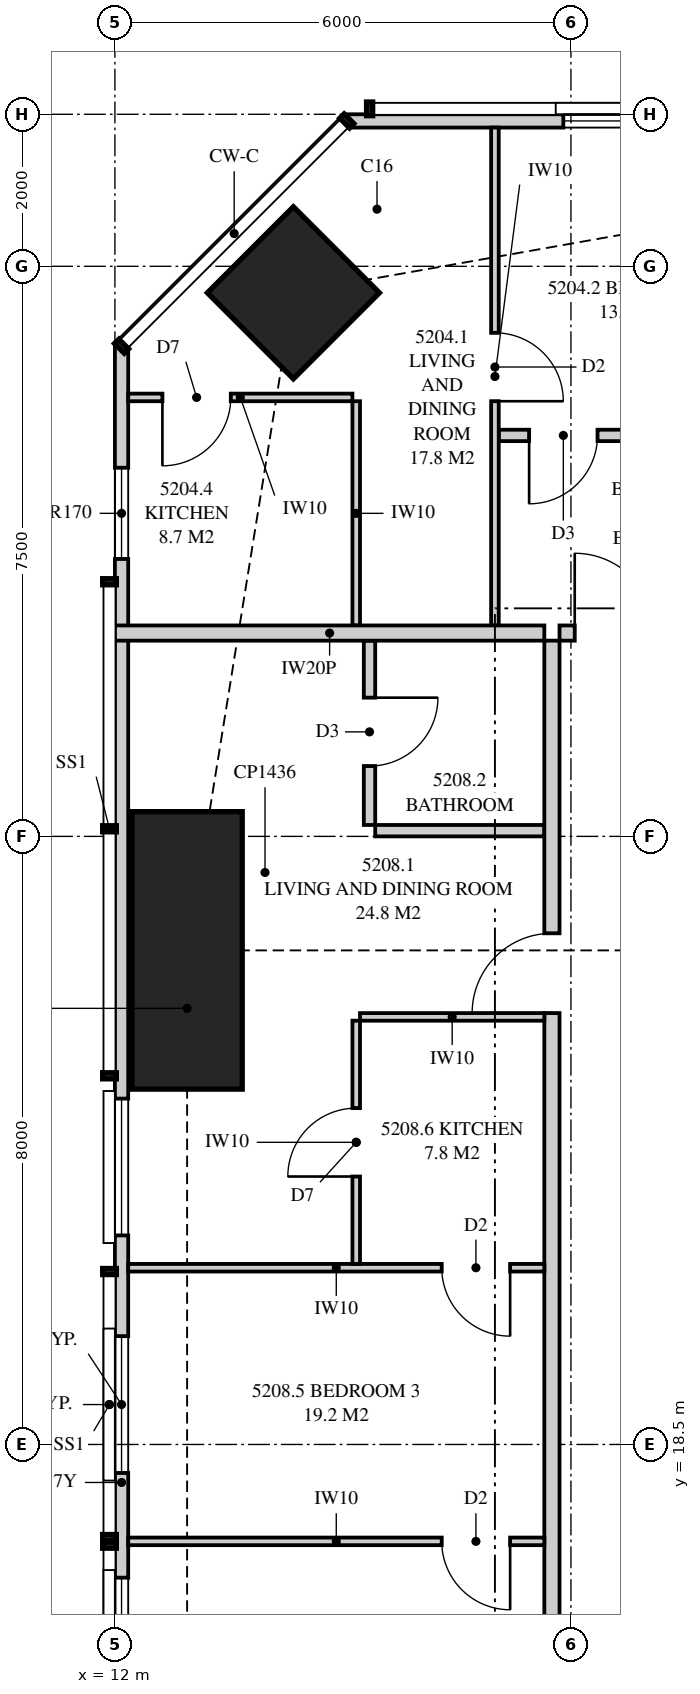
"""IFC4 building model, lengths in metres.
Left out: names, types, materials, properties, quantities, classifications, styles, units other than length and angle.
Written with IfcOpenShell. Run it as: python <this file> out.ifc"""

import sys

from ifc_helpers import new_model, si_unit, direction, frame, frame_2d, origin, origin_2d, place, context, subcontext, project, spatial, polyline, rectangle, outline, extrude, element, fill, save


model = new_model("IFC4")
c1 = context("Model", 3, precision=1e-05, world=origin(), true_north=direction((0.0, 1.0)))
c2 = subcontext(c1, "Body", "Model", "MODEL_VIEW")
j1 = project(units=[si_unit("LENGTHUNIT", "METRE"), si_unit("PLANEANGLEUNIT", "RADIAN")], contexts=[c1])
p1 = place(None, origin())
s1 = spatial("IfcSite", under=j1, at=p1, CompositionType="ELEMENT")
p2 = place(p1, origin())
s2 = spatial("IfcBuilding", under=s1, at=p2, CompositionType="ELEMENT")
p3 = place(p2, frame((0.0, 0.0, 191.2)))
s3 = spatial("IfcBuildingStorey", under=s2, at=p3, CompositionType="ELEMENT", Elevation=191.2)
p4 = place(p3, frame((14.348, 33.652, 0.0), z_axis=(0.0, 0.0, 1.0), x_axis=(0.707106781187, 0.707106781187, 0.0)))
e1 = element("IfcColumn", 1, at=p4, inside=s3, PredefinedType="COLUMN", context=c2, shape_type="SweptSolid", body=[
    extrude(rectangle(XDim=1.6, YDim=1.6, at=origin_2d()), origin(), (0.0, 0.0, 1.0), 3.35),
])
p5 = place(p3, frame((12.95, 25.0, 0.0), z_axis=(0.0, 0.0, 1.0), x_axis=(1.0, 0.0, 0.0)))
e2 = element("IfcColumn", 2, at=p5, inside=s3, PredefinedType="COLUMN", context=c2, shape_type="SweptSolid", body=[
    extrude(rectangle(XDim=1.45, YDim=3.65, at=origin_2d()), origin(), (0.0, 0.0, 1.0), 3.35),
])
p6 = place(p3, frame((49.949, 35.913, 0.0), z_axis=(0.0, 0.0, 1.0), x_axis=(-1.0, 0.0, 0.0)))
e3 = element("IfcWall", 3, at=p6, inside=s3, PredefinedType="SOLIDWALL", context=c2, shape_type="SweptSolid", body=[
    extrude(outline(polyline([(0.0, 0.0), (34.897, 0.0), (34.897, 3.11), (27.91, 3.11), (27.91, 2.15), (27.836, 2.15), (27.836, 3.11), (27.699, 3.11), (27.699, 2.15), (7.199, 2.15), (7.199, 3.11), (7.062, 3.11), (7.062, 2.15), (6.987, 2.15), (6.987, 3.11), (0.0, 3.11), (0.0, 0.0)])), frame((0.0, 0.087, 0.0), z_axis=(0.0, -1.0, 0.0), x_axis=(1.0, 0.0, 0.0)), (0.0, 0.0, 1.0), 0.175),
])
p7 = place(p6, frame((2.75, 0.0, 0.4)))
e4 = element("IfcOpeningElement", 4, at=p7, cuts=e3, PredefinedType="OPENING", context=c2, shape_type="SweptSolid", body=[
    extrude(rectangle(XDim=2.4, YDim=1.7, at=frame_2d((1.2, 0.85))), frame((0.0, 0.097, 0.0), z_axis=(0.0, -1.0, 0.0), x_axis=(1.0, 0.0, 0.0)), (0.0, 0.0, 1.0), 0.195),
])
p8 = place(p6, frame((9.124, 0.0, 0.4)))
e5 = element("IfcOpeningElement", 5, at=p8, cuts=e3, PredefinedType="OPENING", context=c2, shape_type="SweptSolid", body=[
    extrude(rectangle(XDim=1.8, YDim=1.7, at=frame_2d((0.9, 0.85))), frame((0.0, 0.097, 0.0), z_axis=(0.0, -1.0, 0.0), x_axis=(1.0, 0.0, 0.0)), (0.0, 0.0, 1.0), 0.195),
])
p9 = place(p6, frame((13.174, 0.0, 0.0)))
e6 = element("IfcOpeningElement", 6, at=p9, cuts=e3, PredefinedType="OPENING", context=c2, shape_type="SweptSolid", body=[
    extrude(rectangle(XDim=1.8, YDim=2.1, at=frame_2d((0.9, 1.05))), frame((0.0, 0.097, 0.0), z_axis=(0.0, -1.0, 0.0), x_axis=(1.0, 0.0, 0.0)), (0.0, 0.0, 1.0), 0.195),
])
p10 = place(p6, frame((19.849, 0.0, 0.4)))
e7 = element("IfcOpeningElement", 7, at=p10, cuts=e3, PredefinedType="OPENING", context=c2, shape_type="SweptSolid", body=[
    extrude(rectangle(XDim=1.8, YDim=1.7, at=frame_2d((0.9, 0.85))), frame((0.0, 0.097, 0.0), z_axis=(0.0, -1.0, 0.0), x_axis=(1.0, 0.0, 0.0)), (0.0, 0.0, 1.0), 0.195),
])
p11 = place(p6, frame((23.304, 0.0, 0.4)))
e8 = element("IfcOpeningElement", 8, at=p11, cuts=e3, PredefinedType="OPENING", context=c2, shape_type="SweptSolid", body=[
    extrude(rectangle(XDim=2.4, YDim=1.7, at=frame_2d((1.2, 0.85))), frame((0.0, 0.097, 0.0), z_axis=(0.0, -1.0, 0.0), x_axis=(1.0, 0.0, 0.0)), (0.0, 0.0, 1.0), 0.195),
])
p12 = place(p6, frame((30.249, 0.0, 0.4)))
e9 = element("IfcOpeningElement", 9, at=p12, cuts=e3, PredefinedType="OPENING", context=c2, shape_type="SweptSolid", body=[
    extrude(rectangle(XDim=1.8, YDim=1.7, at=frame_2d((0.9, 0.85))), frame((0.0, 0.097, 0.0), z_axis=(0.0, -1.0, 0.0), x_axis=(1.0, 0.0, 0.0)), (0.0, 0.0, 1.0), 0.195),
])
p13 = place(p3, frame((12.087, 32.949, 0.0), z_axis=(0.0, 0.0, 1.0), x_axis=(0.0, -1.0, 0.0)))
e10 = element("IfcWall", 10, at=p13, inside=s3, PredefinedType="SOLIDWALL", context=c2, shape_type="SweptSolid", body=[
    extrude(outline(polyline([(0.0, 0.0), (29.897, 0.0), (29.897, 3.11), (20.191, 3.11), (20.191, 2.15), (20.051, 2.15), (20.051, 3.11), (19.949, 3.11), (19.949, 2.15), (7.949, 2.15), (7.949, 3.11), (7.823, 3.11), (7.823, 2.15), (7.73, 2.15), (7.73, 3.11), (0.0, 3.11), (0.0, 0.0)])), frame((0.0, 0.087, 0.0), z_axis=(0.0, -1.0, 0.0), x_axis=(1.0, 0.0, 0.0)), (0.0, 0.0, 1.0), 0.175),
])
p14 = place(p13, frame((1.599, 0.0, 0.4)))
e11 = element("IfcOpeningElement", 11, at=p14, cuts=e10, PredefinedType="OPENING", context=c2, shape_type="SweptSolid", body=[
    extrude(rectangle(XDim=1.2, YDim=1.7, at=frame_2d((0.6, 0.85))), frame((0.0, 0.097, 0.0), z_axis=(0.0, -1.0, 0.0), x_axis=(1.0, 0.0, 0.0)), (0.0, 0.0, 1.0), 0.195),
])
p15 = place(p13, frame((9.899, 0.0, 0.4)))
e12 = element("IfcOpeningElement", 12, at=p15, cuts=e10, PredefinedType="OPENING", context=c2, shape_type="SweptSolid", body=[
    extrude(rectangle(XDim=1.8, YDim=1.7, at=frame_2d((0.9, 0.85))), frame((0.0, 0.097, 0.0), z_axis=(0.0, -1.0, 0.0), x_axis=(1.0, 0.0, 0.0)), (0.0, 0.0, 1.0), 0.195),
])
p16 = place(p13, frame((13.024, 0.0, 0.4)))
e13 = element("IfcOpeningElement", 13, at=p16, cuts=e10, PredefinedType="OPENING", context=c2, shape_type="SweptSolid", body=[
    extrude(rectangle(XDim=1.8, YDim=1.7, at=frame_2d((0.9, 0.85))), frame((0.0, 0.097, 0.0), z_axis=(0.0, -1.0, 0.0), x_axis=(1.0, 0.0, 0.0)), (0.0, 0.0, 1.0), 0.195),
])
p17 = place(p13, frame((16.201, 0.0, 0.4)))
e14 = element("IfcOpeningElement", 14, at=p17, cuts=e10, PredefinedType="OPENING", context=c2, shape_type="SweptSolid", body=[
    extrude(rectangle(XDim=1.8, YDim=1.7, at=frame_2d((0.9, 0.85))), frame((0.0, 0.097, 0.0), z_axis=(0.0, -1.0, 0.0), x_axis=(1.0, 0.0, 0.0)), (0.0, 0.0, 1.0), 0.195),
])
p18 = place(p13, frame((22.624, 0.0, 0.0)))
e15 = element("IfcOpeningElement", 15, at=p18, cuts=e10, PredefinedType="OPENING", context=c2, shape_type="SweptSolid", body=[
    extrude(rectangle(XDim=1.8, YDim=2.1, at=frame_2d((0.9, 1.05))), frame((0.0, 0.097, 0.0), z_axis=(0.0, -1.0, 0.0), x_axis=(1.0, 0.0, 0.0)), (0.0, 0.0, 1.0), 0.195),
])
p19 = place(p3, frame((17.85, 29.175, 0.0), z_axis=(0.0, 0.0, 1.0), x_axis=(1.0, 0.0, 0.0)))
e16 = element("IfcWall", 16, at=p19, inside=s3, PredefinedType="PARTITIONING", context=c2, shape_type="SweptSolid", body=[
    extrude(rectangle(XDim=2.65, YDim=0.2, at=frame_2d((1.325, 0.0))), origin(), (0.0, 0.0, 1.0), 3.11),
])
p20 = place(p19, frame((0.2, 0.0, 0.0)))
e17 = element("IfcOpeningElement", 17, at=p20, cuts=e16, PredefinedType="OPENING", context=c2, shape_type="SweptSolid", body=[
    extrude(rectangle(XDim=1.05, YDim=2.2, at=frame_2d((0.525, 1.1))), frame((0.0, 0.11, 0.0), z_axis=(0.0, -1.0, 0.0), x_axis=(1.0, 0.0, 0.0)), (0.0, 0.0, 1.0), 0.22),
])
p21 = place(p3, frame((17.0, 35.825, 0.0), z_axis=(0.0, 0.0, 1.0), x_axis=(0.0, -1.0, 0.0)))
e18 = element("IfcWall", 18, at=p21, inside=s3, PredefinedType="PARTITIONING", context=c2, shape_type="SweptSolid", body=[
    extrude(outline(polyline([(0.0, 0.0), (6.55, 0.0), (6.55, 3.11), (2.578, 3.11), (2.578, 2.15), (0.831, 2.15), (0.831, 3.11), (0.0, 3.11), (0.0, 0.0)])), frame((0.0, 0.05, 0.0), z_axis=(0.0, -1.0, 0.0), x_axis=(1.0, 0.0, 0.0)), (0.0, 0.0, 1.0), 0.1),
])
p22 = place(p21, frame((2.7, 0.0, 0.0)))
e19 = element("IfcOpeningElement", 19, at=p22, cuts=e18, PredefinedType="OPENING", context=c2, shape_type="SweptSolid", body=[
    extrude(rectangle(XDim=0.9, YDim=2.1, at=frame_2d((0.45, 1.05))), frame((0.0, 0.06, 0.0), z_axis=(0.0, -1.0, 0.0), x_axis=(1.0, 0.0, 0.0)), (0.0, 0.0, 1.0), 0.12),
])
p23 = place(p3, frame((17.05, 31.775, 0.0), z_axis=(0.0, 0.0, 1.0), x_axis=(1.0, 0.0, 0.0)))
e20 = element("IfcWall", 20, at=p23, inside=s3, PredefinedType="PLUMBINGWALL", context=c2, shape_type="SweptSolid", body=[
    extrude(rectangle(XDim=3.45, YDim=0.15, at=frame_2d((1.725, 0.0))), origin(), (0.0, 0.0, 1.0), 3.11),
])
p24 = place(p23, frame((0.4, 0.0, 0.0)))
e21 = element("IfcOpeningElement", 21, at=p24, cuts=e20, PredefinedType="OPENING", context=c2, shape_type="SweptSolid", body=[
    extrude(rectangle(XDim=0.9, YDim=2.1, at=frame_2d((0.45, 1.05))), frame((0.0, 0.085, 0.0), z_axis=(0.0, -1.0, 0.0), x_axis=(1.0, 0.0, 0.0)), (0.0, 0.0, 1.0), 0.17),
])
p25 = place(p3, frame((12.175, 32.275, 0.0), z_axis=(0.0, 0.0, 1.0), x_axis=(1.0, 0.0, 0.0)))
e22 = element("IfcWall", 22, at=p25, inside=s3, PredefinedType="PARTITIONING", context=c2, shape_type="SweptSolid", body=[
    extrude(outline(polyline([(0.0, 0.0), (2.95, 0.0), (2.95, 3.11), (2.822, 3.11), (2.822, 2.15), (1.08, 2.15), (1.08, 3.11), (0.0, 3.11), (0.0, 0.0)])), frame((0.0, 0.05, 0.0), z_axis=(0.0, -1.0, 0.0), x_axis=(1.0, 0.0, 0.0)), (0.0, 0.0, 1.0), 0.1),
])
p26 = place(p25, frame((0.45, 0.0, 0.0)))
e23 = element("IfcOpeningElement", 23, at=p26, cuts=e22, PredefinedType="OPENING", context=c2, shape_type="SweptSolid", body=[
    extrude(rectangle(XDim=0.9, YDim=2.1, at=frame_2d((0.45, 1.05))), frame((0.0, 0.06, 0.0), z_axis=(0.0, -1.0, 0.0), x_axis=(1.0, 0.0, 0.0)), (0.0, 0.0, 1.0), 0.12),
])
p27 = place(p3, frame((15.175, 32.225, 0.0), z_axis=(0.0, 0.0, 1.0), x_axis=(0.0, -1.0, 0.0)))
e24 = element("IfcWall", 24, at=p27, inside=s3, PredefinedType="PARTITIONING", context=c2, shape_type="SweptSolid", body=[
    extrude(rectangle(XDim=2.95, YDim=0.1, at=frame_2d((1.475, 0.0))), origin(), (0.0, 0.0, 1.0), 3.11),
])
p28 = place(p3, frame((12.0, 29.175, 0.0), z_axis=(0.0, 0.0, 1.0), x_axis=(1.0, 0.0, 0.0)))
e25 = element("IfcWall", 25, at=p28, inside=s3, PredefinedType="PARTITIONING", context=c2, shape_type="SweptSolid", body=[
    extrude(outline(polyline([(0.0, 0.0), (5.65, 0.0), (5.65, 3.11), (2.547, 3.11), (2.547, 2.15), (0.703, 2.15), (0.703, 3.11), (0.0, 3.11), (0.0, 0.0)])), frame((0.0, 0.1, 0.0), z_axis=(0.0, -1.0, 0.0), x_axis=(1.0, 0.0, 0.0)), (0.0, 0.0, 1.0), 0.2),
])
p29 = place(p3, frame((17.75, 7.925, 0.0), z_axis=(0.0, 0.0, 1.0), x_axis=(0.0, 1.0, 0.0)))
e26 = element("IfcWall", 26, at=p29, inside=s3, PredefinedType="PARTITIONING", context=c2, shape_type="SweptSolid", body=[
    extrude(outline(polyline([(0.0, 0.0), (21.15, 0.0), (21.15, 3.11), (17.412, 3.11), (17.412, 2.541), (16.738, 2.541), (16.738, 3.11), (5.412, 3.11), (5.412, 2.541), (4.738, 2.541), (4.738, 3.11), (0.0, 3.11), (0.0, 0.0)])), frame((0.0, 0.1, 0.0), z_axis=(0.0, -1.0, 0.0), x_axis=(1.0, 0.0, 0.0)), (0.0, 0.0, 1.0), 0.2),
])
p30 = place(p29, frame((16.25, 0.0, 0.0)))
e27 = element("IfcOpeningElement", 27, at=p30, cuts=e26, PredefinedType="OPENING", context=c2, shape_type="SweptSolid", body=[
    extrude(rectangle(XDim=1.05, YDim=2.2, at=frame_2d((0.525, 1.1))), frame((0.0, 0.11, 0.0), z_axis=(0.0, -1.0, 0.0), x_axis=(1.0, 0.0, 0.0)), (0.0, 0.0, 1.0), 0.22),
])
p31 = place(p3, frame((15.35, 26.65, 0.0), z_axis=(0.0, 0.0, 1.0), x_axis=(0.0, 1.0, 0.0)))
e28 = element("IfcWall", 28, at=p31, inside=s3, PredefinedType="PLUMBINGWALL", context=c2, shape_type="SweptSolid", body=[
    extrude(rectangle(XDim=2.425, YDim=0.15, at=frame_2d((1.212, 0.0))), origin(), (0.0, 0.0, 1.0), 3.11),
])
p32 = place(p31, frame((0.775, 0.0, 0.0)))
e29 = element("IfcOpeningElement", 29, at=p32, cuts=e28, PredefinedType="OPENING", context=c2, shape_type="SweptSolid", body=[
    extrude(rectangle(XDim=0.9, YDim=2.1, at=frame_2d((0.45, 1.05))), frame((0.0, 0.085, 0.0), z_axis=(0.0, -1.0, 0.0), x_axis=(1.0, 0.0, 0.0)), (0.0, 0.0, 1.0), 0.17),
])
p33 = place(p3, frame((15.425, 26.575, 0.0), z_axis=(0.0, 0.0, 1.0), x_axis=(1.0, 0.0, 0.0)))
e30 = element("IfcWall", 30, at=p33, inside=s3, PredefinedType="PLUMBINGWALL", context=c2, shape_type="SweptSolid", body=[
    extrude(rectangle(XDim=2.225, YDim=0.15, at=frame_2d((1.112, 0.0))), origin(), (0.0, 0.0, 1.0), 3.11),
])
p34 = place(p3, frame((12.175, 17.225, 0.0), z_axis=(0.0, 0.0, 1.0), x_axis=(1.0, 0.0, 0.0)))
e31 = element("IfcWall", 31, at=p34, inside=s3, PredefinedType="PARTITIONING", context=c2, shape_type="SweptSolid", body=[
    extrude(outline(polyline([(0.0, 0.0), (5.475, 0.0), (5.475, 3.11), (1.635, 3.11), (1.635, 2.15), (0.0, 2.15), (0.0, 3.11), (0.0, 0.0)])), frame((0.0, 0.05, 0.0), z_axis=(0.0, -1.0, 0.0), x_axis=(1.0, 0.0, 0.0)), (0.0, 0.0, 1.0), 0.1),
])
p35 = place(p34, frame((4.125, 0.0, 0.0)))
e32 = element("IfcOpeningElement", 32, at=p35, cuts=e31, PredefinedType="OPENING", context=c2, shape_type="SweptSolid", body=[
    extrude(rectangle(XDim=0.9, YDim=2.1, at=frame_2d((0.45, 1.05))), frame((0.0, 0.06, 0.0), z_axis=(0.0, -1.0, 0.0), x_axis=(1.0, 0.0, 0.0)), (0.0, 0.0, 1.0), 0.12),
])
p36 = place(p3, frame((12.175, 20.825, 0.0), z_axis=(0.0, 0.0, 1.0), x_axis=(1.0, 0.0, 0.0)))
e33 = element("IfcWall", 33, at=p36, inside=s3, PredefinedType="PARTITIONING", context=c2, shape_type="SweptSolid", body=[
    extrude(outline(polyline([(0.0, 0.0), (5.475, 0.0), (5.475, 3.11), (1.635, 3.11), (1.635, 2.15), (0.0, 2.15), (0.0, 3.11), (0.0, 0.0)])), frame((0.0, 0.05, 0.0), z_axis=(0.0, -1.0, 0.0), x_axis=(1.0, 0.0, 0.0)), (0.0, 0.0, 1.0), 0.1),
])
p37 = place(p36, frame((4.125, 0.0, 0.0)))
e34 = element("IfcOpeningElement", 34, at=p37, cuts=e33, PredefinedType="OPENING", context=c2, shape_type="SweptSolid", body=[
    extrude(rectangle(XDim=0.9, YDim=2.1, at=frame_2d((0.45, 1.05))), frame((0.0, 0.06, 0.0), z_axis=(0.0, -1.0, 0.0), x_axis=(1.0, 0.0, 0.0)), (0.0, 0.0, 1.0), 0.12),
])
p38 = place(p3, frame((15.175, 20.875, 0.0), z_axis=(0.0, 0.0, 1.0), x_axis=(0.0, 1.0, 0.0)))
e35 = element("IfcWall", 35, at=p38, inside=s3, PredefinedType="PARTITIONING", context=c2, shape_type="SweptSolid", body=[
    extrude(rectangle(XDim=3.2, YDim=0.1, at=frame_2d((1.6, 0.0))), origin(), (0.0, 0.0, 1.0), 3.11),
])
p39 = place(p38, frame((1.15, 0.0, 0.0)))
e36 = element("IfcOpeningElement", 36, at=p39, cuts=e35, PredefinedType="OPENING", context=c2, shape_type="SweptSolid", body=[
    extrude(rectangle(XDim=0.9, YDim=2.1, at=frame_2d((0.45, 1.05))), frame((0.0, 0.06, 0.0), z_axis=(0.0, -1.0, 0.0), x_axis=(1.0, 0.0, 0.0)), (0.0, 0.0, 1.0), 0.12),
])
p40 = place(p3, frame((15.225, 24.125, 0.0), z_axis=(0.0, 0.0, 1.0), x_axis=(1.0, 0.0, 0.0)))
e37 = element("IfcWall", 37, at=p40, inside=s3, PredefinedType="PARTITIONING", context=c2, shape_type="SweptSolid", body=[
    extrude(rectangle(XDim=2.425, YDim=0.1, at=frame_2d((1.212, 0.0))), origin(), (0.0, 0.0, 1.0), 3.11),
])
p41 = place(p12, origin())
e38 = element("IfcWindow", 38, at=p41, inside=s3, PartitioningType="SINGLE_PANEL", PredefinedType="WINDOW", context=c2, shape_type="SweptSolid", body=[
    extrude(rectangle(XDim=1.8, YDim=1.7, at=frame_2d((0.9, 0.85))), frame((0.0, 0.03, 0.0), z_axis=(0.0, -1.0, 0.0), x_axis=(1.0, 0.0, 0.0)), (0.0, 0.0, 1.0), 0.06),
])
fill(e9, e38)
p42 = place(p14, origin())
e39 = element("IfcWindow", 39, at=p42, inside=s3, PartitioningType="SINGLE_PANEL", PredefinedType="WINDOW", context=c2, shape_type="SweptSolid", body=[
    extrude(rectangle(XDim=1.2, YDim=1.7, at=frame_2d((0.6, 0.85))), frame((0.0, 0.03, 0.0), z_axis=(0.0, -1.0, 0.0), x_axis=(1.0, 0.0, 0.0)), (0.0, 0.0, 1.0), 0.06),
])
fill(e11, e39)
p43 = place(p15, origin())
e40 = element("IfcWindow", 40, at=p43, inside=s3, PartitioningType="SINGLE_PANEL", PredefinedType="WINDOW", context=c2, shape_type="SweptSolid", body=[
    extrude(rectangle(XDim=1.8, YDim=1.7, at=frame_2d((0.9, 0.85))), frame((0.0, 0.03, 0.0), z_axis=(0.0, -1.0, 0.0), x_axis=(1.0, 0.0, 0.0)), (0.0, 0.0, 1.0), 0.06),
])
fill(e12, e40)
p44 = place(p16, origin())
e41 = element("IfcWindow", 41, at=p44, inside=s3, PartitioningType="SINGLE_PANEL", PredefinedType="WINDOW", context=c2, shape_type="SweptSolid", body=[
    extrude(rectangle(XDim=1.8, YDim=1.7, at=frame_2d((0.9, 0.85))), frame((0.0, 0.03, 0.0), z_axis=(0.0, -1.0, 0.0), x_axis=(1.0, 0.0, 0.0)), (0.0, 0.0, 1.0), 0.06),
])
fill(e13, e41)
p45 = place(p17, origin())
e42 = element("IfcWindow", 42, at=p45, inside=s3, PartitioningType="SINGLE_PANEL", PredefinedType="WINDOW", context=c2, shape_type="SweptSolid", body=[
    extrude(rectangle(XDim=1.8, YDim=1.7, at=frame_2d((0.9, 0.85))), frame((0.0, 0.03, 0.0), z_axis=(0.0, -1.0, 0.0), x_axis=(1.0, 0.0, 0.0)), (0.0, 0.0, 1.0), 0.06),
])
fill(e14, e42)
p46 = place(p20, origin())
e43 = element("IfcDoor", 43, at=p46, inside=s3, OperationType="SINGLE_SWING_LEFT", PredefinedType="DOOR", context=c2, shape_type="SweptSolid", body=[
    extrude(rectangle(XDim=1.05, YDim=2.2, at=frame_2d((0.525, 1.1))), frame((0.0, 0.025, 0.0), z_axis=(0.0, -1.0, 0.0), x_axis=(1.0, 0.0, 0.0)), (0.0, 0.0, 1.0), 0.05),
])
fill(e17, e43)
p47 = place(p22, origin())
e44 = element("IfcDoor", 44, at=p47, inside=s3, OperationType="SINGLE_SWING_RIGHT", PredefinedType="DOOR", context=c2, shape_type="SweptSolid", body=[
    extrude(rectangle(XDim=0.9, YDim=2.1, at=frame_2d((0.45, 1.05))), frame((0.0, 0.025, 0.0), z_axis=(0.0, -1.0, 0.0), x_axis=(1.0, 0.0, 0.0)), (0.0, 0.0, 1.0), 0.05),
])
fill(e19, e44)
p48 = place(p24, frame((0.9, 0.0, 0.0), z_axis=(0.0, 0.0, 1.0), x_axis=(-1.0, 0.0, 0.0)))
e45 = element("IfcDoor", 45, at=p48, inside=s3, OperationType="SINGLE_SWING_RIGHT", PredefinedType="DOOR", context=c2, shape_type="SweptSolid", body=[
    extrude(rectangle(XDim=0.9, YDim=2.1, at=frame_2d((0.45, 1.05))), frame((0.0, 0.025, 0.0), z_axis=(0.0, -1.0, 0.0), x_axis=(1.0, 0.0, 0.0)), (0.0, 0.0, 1.0), 0.05),
])
fill(e21, e45)
p49 = place(p26, frame((0.9, 0.0, 0.0), z_axis=(0.0, 0.0, 1.0), x_axis=(-1.0, 0.0, 0.0)))
e46 = element("IfcDoor", 46, at=p49, inside=s3, OperationType="SINGLE_SWING_RIGHT", PredefinedType="DOOR", context=c2, shape_type="SweptSolid", body=[
    extrude(rectangle(XDim=0.9, YDim=2.1, at=frame_2d((0.45, 1.05))), frame((0.0, 0.025, 0.0), z_axis=(0.0, -1.0, 0.0), x_axis=(1.0, 0.0, 0.0)), (0.0, 0.0, 1.0), 0.05),
])
fill(e23, e46)
p50 = place(p30, origin())
e47 = element("IfcDoor", 47, at=p50, inside=s3, OperationType="SINGLE_SWING_LEFT", PredefinedType="DOOR", context=c2, shape_type="SweptSolid", body=[
    extrude(rectangle(XDim=1.05, YDim=2.2, at=frame_2d((0.525, 1.1))), frame((0.0, 0.025, 0.0), z_axis=(0.0, -1.0, 0.0), x_axis=(1.0, 0.0, 0.0)), (0.0, 0.0, 1.0), 0.05),
])
fill(e27, e47)
p51 = place(p32, frame((0.9, 0.0, 0.0), z_axis=(0.0, 0.0, 1.0), x_axis=(-1.0, 0.0, 0.0)))
e48 = element("IfcDoor", 48, at=p51, inside=s3, OperationType="SINGLE_SWING_LEFT", PredefinedType="DOOR", context=c2, shape_type="SweptSolid", body=[
    extrude(rectangle(XDim=0.9, YDim=2.1, at=frame_2d((0.45, 1.05))), frame((0.0, 0.025, 0.0), z_axis=(0.0, -1.0, 0.0), x_axis=(1.0, 0.0, 0.0)), (0.0, 0.0, 1.0), 0.05),
])
fill(e29, e48)
p52 = place(p35, frame((0.9, 0.0, 0.0), z_axis=(0.0, 0.0, 1.0), x_axis=(-1.0, 0.0, 0.0)))
e49 = element("IfcDoor", 49, at=p52, inside=s3, OperationType="SINGLE_SWING_LEFT", PredefinedType="DOOR", context=c2, shape_type="SweptSolid", body=[
    extrude(rectangle(XDim=0.9, YDim=2.1, at=frame_2d((0.45, 1.05))), frame((0.0, 0.025, 0.0), z_axis=(0.0, -1.0, 0.0), x_axis=(1.0, 0.0, 0.0)), (0.0, 0.0, 1.0), 0.05),
])
fill(e32, e49)
p53 = place(p37, frame((0.9, 0.0, 0.0), z_axis=(0.0, 0.0, 1.0), x_axis=(-1.0, 0.0, 0.0)))
e50 = element("IfcDoor", 50, at=p53, inside=s3, OperationType="SINGLE_SWING_LEFT", PredefinedType="DOOR", context=c2, shape_type="SweptSolid", body=[
    extrude(rectangle(XDim=0.9, YDim=2.1, at=frame_2d((0.45, 1.05))), frame((0.0, 0.025, 0.0), z_axis=(0.0, -1.0, 0.0), x_axis=(1.0, 0.0, 0.0)), (0.0, 0.0, 1.0), 0.05),
])
fill(e34, e50)
p54 = place(p39, origin())
e51 = element("IfcDoor", 51, at=p54, inside=s3, OperationType="SINGLE_SWING_LEFT", PredefinedType="DOOR", context=c2, shape_type="SweptSolid", body=[
    extrude(rectangle(XDim=0.9, YDim=2.1, at=frame_2d((0.45, 1.05))), frame((0.0, 0.025, 0.0), z_axis=(0.0, -1.0, 0.0), x_axis=(1.0, 0.0, 0.0)), (0.0, 0.0, 1.0), 0.05),
])
fill(e36, e51)
save(model, sys.argv[1])
